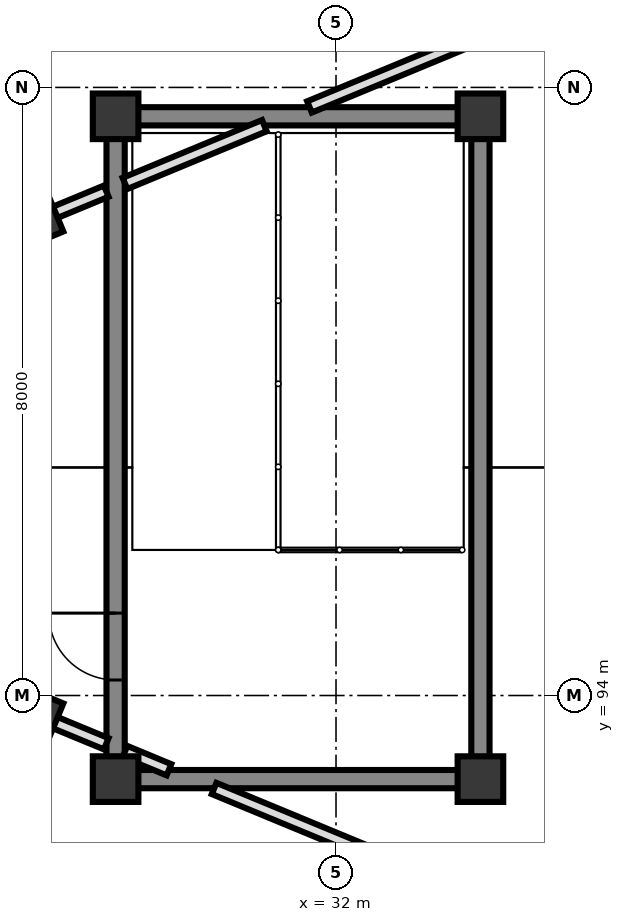
"""IFC4 building model, lengths in metres.
Left out: names, types, materials, properties, quantities, classifications, styles, units other than length and angle.
Written with IfcOpenShell. Run it as: python <this file> out.ifc"""

import sys

from ifc_helpers import new_model, si_unit, direction, frame, frame_2d, origin, origin_2d, place, context, subcontext, project, spatial, rectangle, extrude, element, fill, save


model = new_model("IFC4")
c1 = context("Model", 3, precision=1e-05, world=origin(), true_north=direction((0.0, 1.0)))
c2 = subcontext(c1, "Body", "Model", "MODEL_VIEW")
j1 = project(units=[si_unit("LENGTHUNIT", "METRE"), si_unit("PLANEANGLEUNIT", "RADIAN")], contexts=[c1])
p1 = place(None, origin())
s1 = spatial("IfcSite", under=j1, at=p1, CompositionType="ELEMENT")
p2 = place(p1, origin())
s2 = spatial("IfcBuilding", under=s1, at=p2, CompositionType="ELEMENT")
p3 = place(p2, frame((0.0, 0.0, 12.5)))
s3 = spatial("IfcBuildingStorey", under=s2, at=p3, CompositionType="ELEMENT", Elevation=12.5)
for number, where, z_axis, x_axis in (
    (1, (29.1, 92.9, 0.0), (0.0, 0.0, 1.0), (1.0, 0.0, 0.0)),
    (2, (33.9, 92.9, 0.0), (0.0, 0.0, 1.0), (1.0, 0.0, 0.0)),
    (3, (33.9, 101.62, 0.0), (0.0, 0.0, 1.0), (1.0, 0.0, 0.0)),
    (4, (29.1, 101.62, 0.0), (0.0, 0.0, 1.0), (1.0, 0.0, 0.0)),
):
    element("IfcColumn", number, at=place(p3, frame(where, z_axis=z_axis, x_axis=x_axis)), inside=s3, PredefinedType="COLUMN", context=c2, shape_type="SweptSolid", body=[
        extrude(rectangle(XDim=0.6, YDim=0.6, at=origin_2d()), origin(), (0.0, 0.0, 1.0), 4.0),
    ])
for number, where, z_axis, x_axis in (
    (5, (28.053, 100.253, 0.0), (0.0, 0.0, 1.0), (0.924, 0.383, 0.0)),
    (6, (28.053, 93.747, 0.0), (0.0, 0.0, 1.0), (0.924, -0.383, 0.0)),
):
    element("IfcColumn", number, at=place(p3, frame(where, z_axis=z_axis, x_axis=x_axis)), inside=s3, PredefinedType="COLUMN", context=c2, shape_type="SweptSolid", body=[
        extrude(rectangle(XDim=0.55, YDim=0.55, at=origin_2d()), origin(), (0.0, 0.0, 1.0), 4.49),
    ])
p4 = place(p3, frame((29.1, 93.192, 0.0), z_axis=(0.0, 0.0, 1.0), x_axis=(0.0, 1.0, 0.0)))
e7 = element("IfcWall", 7, at=p4, inside=s3, PredefinedType="SHEAR", context=c2, shape_type="SweptSolid", body=[
    extrude(rectangle(XDim=8.136, YDim=0.24, at=frame_2d((4.068, 0.0))), origin(), (0.0, 0.0, 1.0), 3.74),
])
p5 = place(p4, frame((1.012, 0.0, 0.0)))
e8 = element("IfcOpeningElement", 8, at=p5, cuts=e7, PredefinedType="OPENING", context=c2, shape_type="SweptSolid", body=[
    extrude(rectangle(XDim=0.88, YDim=2.1, at=frame_2d((0.44, 1.05))), frame((0.0, 0.13, 0.0), z_axis=(0.0, -1.0, 0.0), x_axis=(1.0, 0.0, 0.0)), (0.0, 0.0, 1.0), 0.26),
])
p6 = place(p3, frame((33.9, 101.328, 0.0), z_axis=(0.0, 0.0, 1.0), x_axis=(0.0, -1.0, 0.0)))
e9 = element("IfcWall", 9, at=p6, inside=s3, PredefinedType="SHEAR", context=c2, shape_type="SweptSolid", body=[
    extrude(rectangle(XDim=8.136, YDim=0.24, at=frame_2d((4.068, 0.0))), origin(), (0.0, 0.0, 1.0), 3.74),
])
for number, where, z_axis, x_axis in (
    (10, (33.608, 92.9, 0.0), (0.0, 0.0, 1.0), (-1.0, 0.0, 0.0)),
    (11, (33.608, 101.62, 0.0), (0.0, 0.0, 1.0), (-1.0, 0.0, 0.0)),
):
    element("IfcWall", number, at=place(p3, frame(where, z_axis=z_axis, x_axis=x_axis)), inside=s3, PredefinedType="SHEAR", context=c2, shape_type="SweptSolid", body=[
        extrude(rectangle(XDim=4.216, YDim=0.24, at=frame_2d((2.108, 0.0))), origin(), (0.0, 0.0, 1.0), 3.74),
    ])
p7 = place(p3, frame((28.3, 100.355, 0.0), z_axis=(0.0, 0.0, 1.0), x_axis=(0.924069600435, 0.382224245113, 0.0)))
e12 = element("IfcWall", 12, at=p7, inside=s3, PredefinedType="PARTITIONING", context=c2, shape_type="SweptSolid", body=[
    extrude(rectangle(XDim=0.733, YDim=0.16, at=frame_2d((0.366, 0.0))), origin(), (0.0, 0.0, 1.0), 3.7),
])
p8 = place(p3, frame((29.223, 100.737, 0.0), z_axis=(0.0, 0.0, 1.0), x_axis=(0.923817443679, 0.382833293686, 0.0)))
e13 = element("IfcWall", 13, at=p8, inside=s3, PredefinedType="PARTITIONING", context=c2, shape_type="SweptSolid", body=[
    extrude(rectangle(XDim=1.985, YDim=0.16, at=frame_2d((0.993, 0.0))), origin(), (0.0, 0.0, 1.0), 3.7),
])
p9 = place(p3, frame((31.651, 101.743, 0.0), z_axis=(0.0, 0.0, 1.0), x_axis=(0.923877739946, 0.382687759972, 0.0)))
e14 = element("IfcWall", 14, at=p9, inside=s3, PredefinedType="PARTITIONING", context=c2, shape_type="SweptSolid", body=[
    extrude(rectangle(XDim=4.813, YDim=0.16, at=frame_2d((2.407, 0.0))), origin(), (0.0, 0.0, 1.0), 3.7),
])
p10 = place(p3, frame((28.3, 93.645, 0.0), z_axis=(0.0, 0.0, 1.0), x_axis=(0.924069600435, -0.382224245113, 0.0)))
e15 = element("IfcWall", 15, at=p10, inside=s3, PredefinedType="PARTITIONING", context=c2, shape_type="SweptSolid", body=[
    extrude(rectangle(XDim=0.733, YDim=0.16, at=frame_2d((0.366, 0.0))), origin(), (0.0, 0.0, 1.0), 3.7),
])
p11 = place(p3, frame((29.223, 93.263, 0.0), z_axis=(0.0, 0.0, 1.0), x_axis=(0.923812676193, -0.382844797933, 0.0)))
e16 = element("IfcWall", 16, at=p11, inside=s3, PredefinedType="PARTITIONING", context=c2, shape_type="SweptSolid", body=[
    extrude(rectangle(XDim=0.627, YDim=0.16, at=frame_2d((0.313, 0.0))), origin(), (0.0, 0.0, 1.0), 3.7),
])
p12 = place(p3, frame((30.396, 92.777, 0.0), z_axis=(0.0, 0.0, 1.0), x_axis=(0.923864955254, -0.382718623082, 0.0)))
e17 = element("IfcWall", 17, at=p12, inside=s3, PredefinedType="PARTITIONING", context=c2, shape_type="SweptSolid", body=[
    extrude(rectangle(XDim=6.172, YDim=0.16, at=frame_2d((3.086, 0.0))), origin(), (0.0, 0.0, 1.0), 3.7),
])
p13 = place(p5, origin())
e18 = element("IfcDoor", 18, at=p13, inside=s3, OperationType="SINGLE_SWING_RIGHT", PredefinedType="DOOR", context=c2, shape_type="SweptSolid", body=[
    extrude(rectangle(XDim=0.88, YDim=2.1, at=frame_2d((0.44, 1.05))), frame((0.0, 0.025, 0.0), z_axis=(0.0, -1.0, 0.0), x_axis=(1.0, 0.0, 0.0)), (0.0, 0.0, 1.0), 0.05),
])
fill(e8, e18)
save(model, sys.argv[1])
